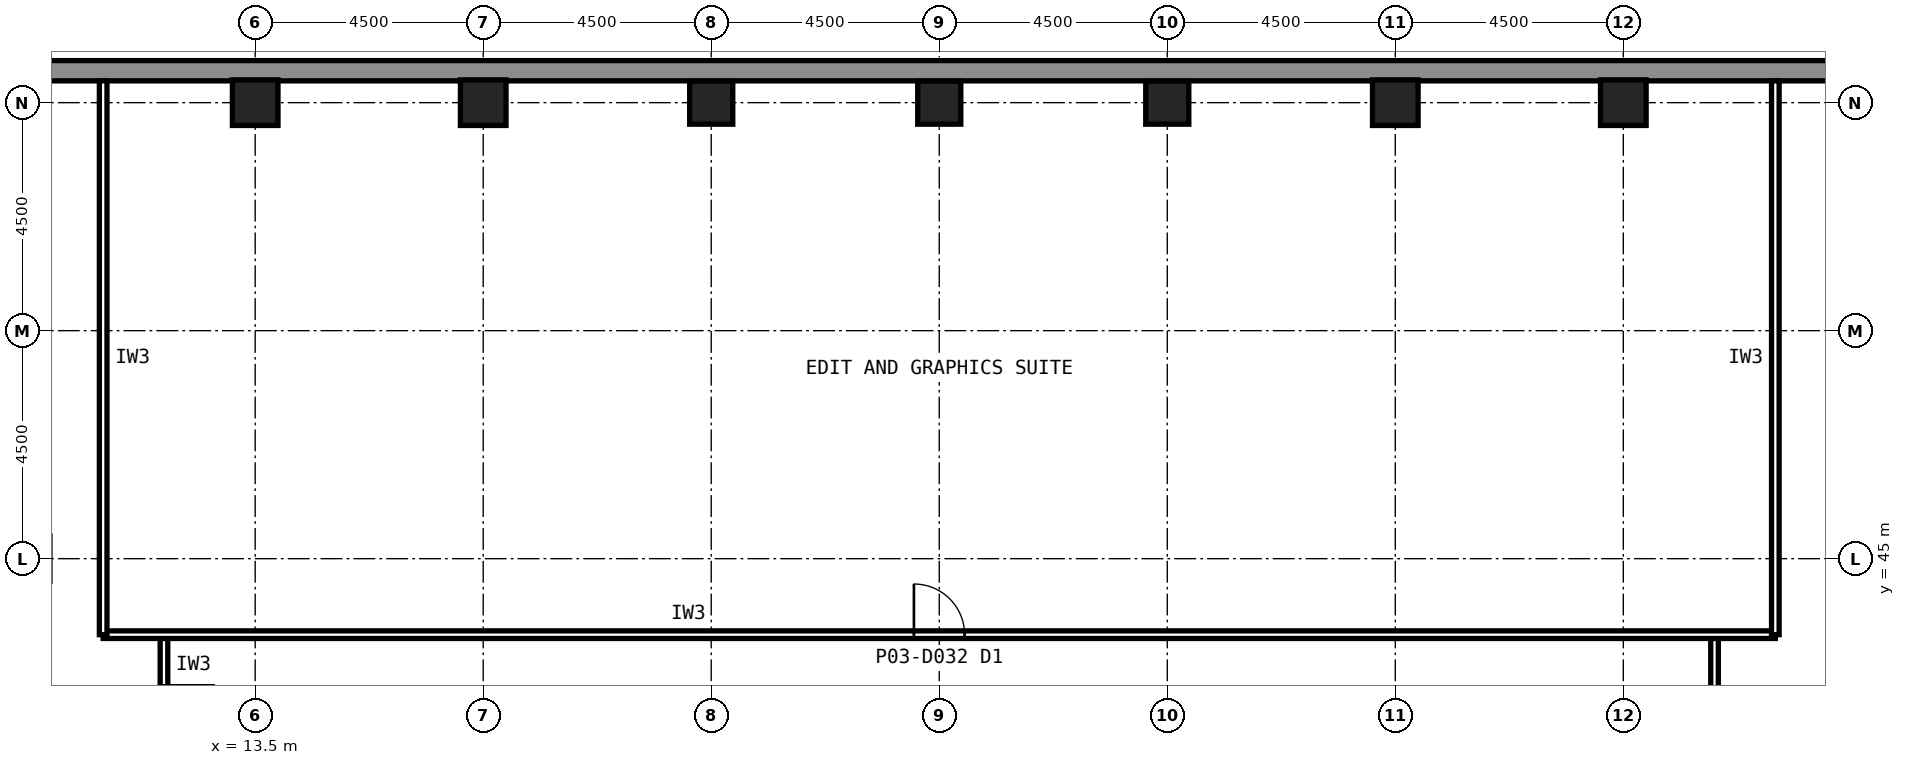
"""IFC4 building model, lengths in metres.
Left out: names, types, materials, properties, quantities, classifications, styles, units other than length and angle.
Written with IfcOpenShell. Run it as: python <this file> out.ifc"""

import sys

from ifc_helpers import new_model, si_unit, direction, frame, frame_2d, origin, origin_2d, place, context, subcontext, project, spatial, rectangle, hollow_rectangle, extrude, element, fill, save


model = new_model("IFC4")
c1 = context("Model", 3, precision=1e-05, world=origin(), true_north=direction((0.0, 1.0)))
c2 = subcontext(c1, "Body", "Model", "MODEL_VIEW")
j1 = project(units=[si_unit("LENGTHUNIT", "METRE"), si_unit("PLANEANGLEUNIT", "RADIAN")], contexts=[c1])
p1 = place(None, origin())
s1 = spatial("IfcSite", under=j1, at=p1, CompositionType="ELEMENT")
p2 = place(p1, origin())
s2 = spatial("IfcBuilding", under=s1, at=p2, CompositionType="ELEMENT")
p3 = place(p2, frame((0.0, 0.0, 12.0)))
s3 = spatial("IfcBuildingStorey", under=s2, at=p3, CompositionType="ELEMENT", Elevation=12.0)
for number, where, z_axis, x_axis in (
    (1, (40.5, 54.0, 0.0), (0.0, 0.0, 1.0), (1.0, 0.0, 0.0)),
    (2, (36.0, 54.0, 0.0), (0.0, 0.0, 1.0), (1.0, 0.0, 0.0)),
):
    element("IfcColumn", number, at=place(p3, frame(where, z_axis=z_axis, x_axis=x_axis)), inside=s3, PredefinedType="COLUMN", context=c2, shape_type="SweptSolid", body=[
        extrude(hollow_rectangle(XDim=0.9, YDim=0.9, WallThickness=0.063, at=origin_2d()), origin(), (0.0, 0.0, 1.0), 6.0),
    ])
for number, where, z_axis, x_axis in (
    (3, (31.5, 54.0, 0.0), (0.0, 0.0, 1.0), (1.0, 0.0, 0.0)),
    (4, (27.0, 54.0, 0.0), (0.0, 0.0, 1.0), (1.0, 0.0, 0.0)),
    (5, (22.5, 54.0, 0.0), (0.0, 0.0, 1.0), (1.0, 0.0, 0.0)),
):
    element("IfcColumn", number, at=place(p3, frame(where, z_axis=z_axis, x_axis=x_axis)), inside=s3, PredefinedType="COLUMN", context=c2, shape_type="SweptSolid", body=[
        extrude(hollow_rectangle(XDim=0.85, YDim=0.85, WallThickness=0.05, at=origin_2d()), origin(), (0.0, 0.0, 1.0), 6.0),
    ])
for number, where, z_axis, x_axis in (
    (6, (18.0, 54.0, 0.0), (0.0, 0.0, 1.0), (1.0, 0.0, 0.0)),
    (7, (13.5, 54.0, 0.0), (0.0, 0.0, 1.0), (1.0, 0.0, 0.0)),
):
    element("IfcColumn", number, at=place(p3, frame(where, z_axis=z_axis, x_axis=x_axis)), inside=s3, PredefinedType="COLUMN", context=c2, shape_type="SweptSolid", body=[
        extrude(hollow_rectangle(XDim=0.9, YDim=0.9, WallThickness=0.063, at=origin_2d()), origin(), (0.0, 0.0, 1.0), 6.0),
    ])
p4 = place(p3, frame((-4.761, 54.63, 0.0), z_axis=(0.0, 0.0, 1.0), x_axis=(1.0, 0.0, 0.0)))
e8 = element("IfcWall", 8, at=p4, inside=s3, PredefinedType="SOLIDWALL", context=c2, shape_type="SweptSolid", body=[
    extrude(rectangle(XDim=63.522, YDim=0.4, at=frame_2d((31.761, 0.0))), origin(), (0.0, 0.0, 1.0), 6.0),
])
p5 = place(p3, frame((42.3, 36.0, 0.0), z_axis=(0.0, 0.0, 1.0), x_axis=(0.0, 1.0, 0.0)))
e9 = element("IfcWall", 9, at=p5, inside=s3, PredefinedType="PARTITIONING", context=c2, shape_type="SweptSolid", body=[
    extrude(rectangle(XDim=7.5, YDim=0.15, at=frame_2d((3.75, 0.0))), origin(), (0.0, 0.0, 1.0), 5.8),
])
p6 = place(p5, frame((3.25, 0.0, 0.0)))
e10 = element("IfcOpeningElement", 10, at=p6, cuts=e9, PredefinedType="OPENING", context=c2, shape_type="SweptSolid", body=[
    extrude(rectangle(XDim=1.0, YDim=2.1, at=frame_2d((0.5, 1.05))), frame((0.0, 0.085, 0.0), z_axis=(0.0, -1.0, 0.0), x_axis=(1.0, 0.0, 0.0)), (0.0, 0.0, 1.0), 0.17),
])
p7 = place(p3, frame((11.7, 43.5, 0.0), z_axis=(0.0, 0.0, 1.0), x_axis=(0.0, -1.0, 0.0)))
e11 = element("IfcWall", 11, at=p7, inside=s3, PredefinedType="PARTITIONING", context=c2, shape_type="SweptSolid", body=[
    extrude(rectangle(XDim=3.0, YDim=0.15, at=frame_2d((1.5, 0.0))), origin(), (0.0, 0.0, 1.0), 5.8),
])
p8 = place(p7, frame((1.0, 0.0, 0.0)))
e12 = element("IfcOpeningElement", 12, at=p8, cuts=e11, PredefinedType="OPENING", context=c2, shape_type="SweptSolid", body=[
    extrude(rectangle(XDim=1.0, YDim=2.1, at=frame_2d((0.5, 1.05))), frame((0.0, 0.085, 0.0), z_axis=(0.0, -1.0, 0.0), x_axis=(1.0, 0.0, 0.0)), (0.0, 0.0, 1.0), 0.17),
])
p9 = place(p3, frame((10.5, 43.5, 0.0), z_axis=(0.0, 0.0, 1.0), x_axis=(1.0, 0.0, 0.0)))
e13 = element("IfcWall", 13, at=p9, inside=s3, PredefinedType="PARTITIONING", context=c2, shape_type="SweptSolid", body=[
    extrude(rectangle(XDim=33.0, YDim=0.15, at=frame_2d((16.5, 0.0))), origin(), (0.0, 0.0, 1.0), 5.8),
])
p10 = place(p9, frame((16.0, 0.0, 0.0)))
e14 = element("IfcOpeningElement", 14, at=p10, cuts=e13, PredefinedType="OPENING", context=c2, shape_type="SweptSolid", body=[
    extrude(rectangle(XDim=1.0, YDim=2.1, at=frame_2d((0.5, 1.05))), frame((0.0, 0.085, 0.0), z_axis=(0.0, -1.0, 0.0), x_axis=(1.0, 0.0, 0.0)), (0.0, 0.0, 1.0), 0.17),
])
for number, where, z_axis, x_axis in (
    (15, (43.5, 43.5, 0.0), (0.0, 0.0, 1.0), (0.0, 1.0, 0.0)),
    (16, (10.5, 54.43, 0.0), (0.0, 0.0, 1.0), (0.0, -1.0, 0.0)),
):
    element("IfcWall", number, at=place(p3, frame(where, z_axis=z_axis, x_axis=x_axis)), inside=s3, PredefinedType="PARTITIONING", context=c2, shape_type="SweptSolid", body=[
        extrude(rectangle(XDim=10.93, YDim=0.15, at=frame_2d((5.465, 0.0))), origin(), (0.0, 0.0, 1.0), 5.8),
    ])
p11 = place(p10, origin())
e17 = element("IfcDoor", 17, at=p11, inside=s3, OperationType="SINGLE_SWING_LEFT", PredefinedType="DOOR", context=c2, shape_type="SweptSolid", body=[
    extrude(rectangle(XDim=1.0, YDim=2.1, at=frame_2d((0.5, 1.05))), frame((0.0, 0.025, 0.0), z_axis=(0.0, -1.0, 0.0), x_axis=(1.0, 0.0, 0.0)), (0.0, 0.0, 1.0), 0.05),
])
fill(e14, e17)
save(model, sys.argv[1])
